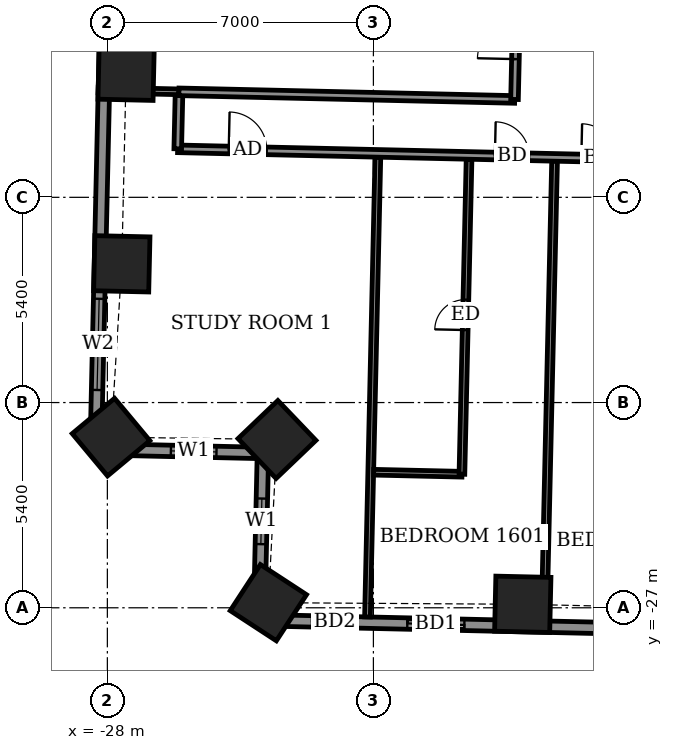
"""IFC4 building model, lengths in metres.
Left out: names, types, materials, properties, quantities, classifications, styles, units other than length and angle.
Written with IfcOpenShell. Run it as: python <this file> out.ifc"""

import sys

from ifc_helpers import new_model, si_unit, direction, frame, frame_2d, origin, origin_2d, place, context, subcontext, project, spatial, rectangle, extrude, element, fill, save


model = new_model("IFC4")
c1 = context("Model", 3, precision=1e-05, world=origin(), true_north=direction((0.0, 1.0)))
c2 = subcontext(c1, "Body", "Model", "MODEL_VIEW")
j1 = project(units=[si_unit("LENGTHUNIT", "METRE"), si_unit("PLANEANGLEUNIT", "RADIAN")], contexts=[c1])
p1 = place(None, origin())
s1 = spatial("IfcSite", under=j1, at=p1, CompositionType="ELEMENT")
p2 = place(p1, origin())
s2 = spatial("IfcBuilding", under=s1, at=p2, CompositionType="ELEMENT")
p3 = place(p2, frame((0.0, 0.0, 67.5)))
s3 = spatial("IfcBuildingStorey", under=s2, at=p3, CompositionType="ELEMENT", Elevation=67.5)
for number, where, z_axis, x_axis in (
    (1, (-27.506, -12.909, -0.55), (0.0, 0.0, 1.0), (-0.023, -1.0, 0.0)),
    (2, (-27.62, -17.949, -0.55), (0.0, 0.0, 1.0), (-0.023, -1.0, 0.0)),
    (3, (-27.903, -22.51, -0.55), (0.0, 0.0, 1.0), (0.64, -0.768, 0.0)),
    (4, (-23.537, -22.572, -0.55), (0.0, 0.0, 1.0), (0.691, -0.723, 0.0)),
    (5, (-23.763, -26.865, -0.55), (0.0, 0.0, 1.0), (0.837, -0.547, 0.0)),
    (6, (-17.07, -26.908, -0.55), (0.0, 0.0, 1.0), (1.0, -0.023, 0.0)),
):
    element("IfcColumn", number, at=place(p3, frame(where, z_axis=z_axis, x_axis=x_axis)), inside=s3, PredefinedType="COLUMN", context=c2, shape_type="SweptSolid", body=[
        extrude(rectangle(XDim=1.45, YDim=1.45, at=origin_2d()), origin(), (0.0, 0.0, 1.0), 3.6),
    ])
p4 = place(p3, frame((-27.965, -7.802, 0.0), z_axis=(0.0, 0.0, 1.0), x_axis=(-0.02267786199, -0.999742824218, 0.0)))
e7 = element("IfcWall", 7, at=p4, inside=s3, PredefinedType="SOLIDWALL", context=c2, shape_type="SweptSolid", body=[
    extrude(rectangle(XDim=15.029, YDim=0.3, at=frame_2d((7.514, 0.0))), origin(), (0.0, 0.0, 1.0), 3.05),
])
p5 = place(p4, frame((1.826, 0.0, 0.0)))
e8 = element("IfcOpeningElement", 8, at=p5, cuts=e7, PredefinedType="OPENING", context=c2, shape_type="SweptSolid", body=[
    extrude(rectangle(XDim=1.5, YDim=2.4, at=frame_2d((0.75, 1.2))), frame((0.0, 0.16, 0.0), z_axis=(0.0, -1.0, 0.0), x_axis=(1.0, 0.0, 0.0)), (0.0, 0.0, 1.0), 0.32),
])
p6 = place(p4, frame((11.071, 0.0, 0.9)))
e9 = element("IfcOpeningElement", 9, at=p6, cuts=e7, PredefinedType="OPENING", context=c2, shape_type="SweptSolid", body=[
    extrude(rectangle(XDim=2.4, YDim=1.5, at=frame_2d((1.2, 0.75))), frame((0.0, 0.16, 0.0), z_axis=(0.0, -1.0, 0.0), x_axis=(1.0, 0.0, 0.0)), (0.0, 0.0, 1.0), 0.32),
])
p7 = place(p3, frame((-28.306, -22.827, 0.0), z_axis=(0.0, 0.0, 1.0), x_axis=(0.999741204967, -0.022749133868, 0.0)))
e10 = element("IfcWall", 10, at=p7, inside=s3, PredefinedType="SOLIDWALL", context=c2, shape_type="SweptSolid", body=[
    extrude(rectangle(XDim=4.4, YDim=0.3, at=frame_2d((2.2, 0.0))), origin(), (0.0, 0.0, 1.0), 2.55),
])
p8 = place(p7, frame((1.978, 0.0, 0.9)))
e11 = element("IfcOpeningElement", 11, at=p8, cuts=e10, PredefinedType="OPENING", context=c2, shape_type="SweptSolid", body=[
    extrude(rectangle(XDim=1.2, YDim=1.5, at=frame_2d((0.6, 0.75))), frame((0.0, 0.16, 0.0), z_axis=(0.0, -1.0, 0.0), x_axis=(1.0, 0.0, 0.0)), (0.0, 0.0, 1.0), 0.32),
])
p9 = place(p3, frame((-23.907, -22.927, 0.0), z_axis=(0.0, 0.0, 1.0), x_axis=(-0.022749133868, -0.999741204967, 0.0)))
e12 = element("IfcWall", 12, at=p9, inside=s3, PredefinedType="SOLIDWALL", context=c2, shape_type="SweptSolid", body=[
    extrude(rectangle(XDim=4.4, YDim=0.3, at=frame_2d((2.2, 0.0))), origin(), (0.0, 0.0, 1.0), 2.55),
])
p10 = place(p9, frame((1.199, 0.0, 0.9)))
e13 = element("IfcOpeningElement", 13, at=p10, cuts=e12, PredefinedType="OPENING", context=c2, shape_type="SweptSolid", body=[
    extrude(rectangle(XDim=1.2, YDim=1.5, at=frame_2d((0.6, 0.75))), frame((0.0, 0.16, 0.0), z_axis=(0.0, -1.0, 0.0), x_axis=(1.0, 0.0, 0.0)), (0.0, 0.0, 1.0), 0.32),
])
p11 = place(p3, frame((-24.007, -27.326, 0.0), z_axis=(0.0, 0.0, 1.0), x_axis=(0.999742536491, -0.022690542744, 0.0)))
e14 = element("IfcWall", 14, at=p11, inside=s3, PredefinedType="SOLIDWALL", context=c2, shape_type="SweptSolid", body=[
    extrude(rectangle(XDim=49.236, YDim=0.3, at=frame_2d((24.618, 0.0))), origin(), (0.0, 0.0, 1.0), 3.05),
])
p12 = place(p11, frame((1.391, 0.0, 0.0)))
e15 = element("IfcOpeningElement", 15, at=p12, cuts=e14, PredefinedType="OPENING", context=c2, shape_type="SweptSolid", body=[
    extrude(rectangle(XDim=1.2, YDim=2.4, at=frame_2d((0.6, 1.2))), frame((0.0, 0.16, 0.0), z_axis=(0.0, -1.0, 0.0), x_axis=(1.0, 0.0, 0.0)), (0.0, 0.0, 1.0), 0.32),
])
p13 = place(p11, frame((3.901, 0.0, 0.0)))
e16 = element("IfcOpeningElement", 16, at=p13, cuts=e14, PredefinedType="OPENING", context=c2, shape_type="SweptSolid", body=[
    extrude(rectangle(XDim=1.5, YDim=2.4, at=frame_2d((0.75, 1.2))), frame((0.0, 0.16, 0.0), z_axis=(0.0, -1.0, 0.0), x_axis=(1.0, 0.0, 0.0)), (0.0, 0.0, 1.0), 0.32),
])
p14 = place(p11, frame((9.1, 0.0, 0.0)))
e17 = element("IfcOpeningElement", 17, at=p14, cuts=e14, PredefinedType="OPENING", context=c2, shape_type="SweptSolid", body=[
    extrude(rectangle(XDim=1.5, YDim=2.4, at=frame_2d((0.75, 1.2))), frame((0.0, 0.16, 0.0), z_axis=(0.0, -1.0, 0.0), x_axis=(1.0, 0.0, 0.0)), (0.0, 0.0, 1.0), 0.32),
])
p15 = place(p11, frame((14.889, 0.0, 0.0)))
e18 = element("IfcOpeningElement", 18, at=p15, cuts=e14, PredefinedType="OPENING", context=c2, shape_type="SweptSolid", body=[
    extrude(rectangle(XDim=1.5, YDim=2.4, at=frame_2d((0.75, 1.2))), frame((0.0, 0.16, 0.0), z_axis=(0.0, -1.0, 0.0), x_axis=(1.0, 0.0, 0.0)), (0.0, 0.0, 1.0), 0.32),
])
p16 = place(p11, frame((17.952, 0.0, 0.0)))
e19 = element("IfcOpeningElement", 19, at=p16, cuts=e14, PredefinedType="OPENING", context=c2, shape_type="SweptSolid", body=[
    extrude(rectangle(XDim=1.5, YDim=2.4, at=frame_2d((0.75, 1.2))), frame((0.0, 0.16, 0.0), z_axis=(0.0, -1.0, 0.0), x_axis=(1.0, 0.0, 0.0)), (0.0, 0.0, 1.0), 0.32),
])
p17 = place(p11, frame((22.878, 0.0, 0.0)))
e20 = element("IfcOpeningElement", 20, at=p17, cuts=e14, PredefinedType="OPENING", context=c2, shape_type="SweptSolid", body=[
    extrude(rectangle(XDim=1.5, YDim=2.4, at=frame_2d((0.75, 1.2))), frame((0.0, 0.16, 0.0), z_axis=(0.0, -1.0, 0.0), x_axis=(1.0, 0.0, 0.0)), (0.0, 0.0, 1.0), 0.32),
])
p18 = place(p11, frame((26.091, 0.0, 0.0)))
e21 = element("IfcOpeningElement", 21, at=p18, cuts=e14, PredefinedType="OPENING", context=c2, shape_type="SweptSolid", body=[
    extrude(rectangle(XDim=1.2, YDim=2.4, at=frame_2d((0.6, 1.2))), frame((0.0, 0.16, 0.0), z_axis=(0.0, -1.0, 0.0), x_axis=(1.0, 0.0, 0.0)), (0.0, 0.0, 1.0), 0.32),
])
p19 = place(p11, frame((31.754, 0.0, 0.0)))
e22 = element("IfcOpeningElement", 22, at=p19, cuts=e14, PredefinedType="OPENING", context=c2, shape_type="SweptSolid", body=[
    extrude(rectangle(XDim=1.5, YDim=2.4, at=frame_2d((0.75, 1.2))), frame((0.0, 0.16, 0.0), z_axis=(0.0, -1.0, 0.0), x_axis=(1.0, 0.0, 0.0)), (0.0, 0.0, 1.0), 0.32),
])
p20 = place(p11, frame((36.854, 0.0, 0.0)))
e23 = element("IfcOpeningElement", 23, at=p20, cuts=e14, PredefinedType="OPENING", context=c2, shape_type="SweptSolid", body=[
    extrude(rectangle(XDim=1.5, YDim=2.4, at=frame_2d((0.75, 1.2))), frame((0.0, 0.16, 0.0), z_axis=(0.0, -1.0, 0.0), x_axis=(1.0, 0.0, 0.0)), (0.0, 0.0, 1.0), 0.32),
])
p21 = place(p11, frame((39.917, 0.0, 0.0)))
e24 = element("IfcOpeningElement", 24, at=p21, cuts=e14, PredefinedType="OPENING", context=c2, shape_type="SweptSolid", body=[
    extrude(rectangle(XDim=1.5, YDim=2.4, at=frame_2d((0.75, 1.2))), frame((0.0, 0.16, 0.0), z_axis=(0.0, -1.0, 0.0), x_axis=(1.0, 0.0, 0.0)), (0.0, 0.0, 1.0), 0.32),
])
p22 = place(p11, frame((45.072, 0.0, 0.9)))
e25 = element("IfcOpeningElement", 25, at=p22, cuts=e14, PredefinedType="OPENING", context=c2, shape_type="SweptSolid", body=[
    extrude(rectangle(XDim=2.4, YDim=1.5, at=frame_2d((1.2, 0.75))), frame((0.0, 0.16, 0.0), z_axis=(0.0, -1.0, 0.0), x_axis=(1.0, 0.0, 0.0)), (0.0, 0.0, 1.0), 0.32),
])
p23 = place(p3, frame((-21.156, -27.241, 0.0), z_axis=(0.0, 0.0, 1.0), x_axis=(0.022636621344, 0.999743758857, 0.0)))
e26 = element("IfcWall", 26, at=p23, inside=s3, PredefinedType="PARTITIONING", context=c2, shape_type="SweptSolid", body=[
    extrude(rectangle(XDim=12.101, YDim=0.15, at=frame_2d((6.051, 0.0))), origin(), (0.0, 0.0, 1.0), 2.55),
])
p24 = place(p3, frame((-16.508, -27.346, 0.0), z_axis=(0.0, 0.0, 1.0), x_axis=(0.02273928012, 0.99974142914, 0.0)))
e27 = element("IfcWall", 27, at=p24, inside=s3, PredefinedType="PARTITIONING", context=c2, shape_type="SweptSolid", body=[
    extrude(rectangle(XDim=12.1, YDim=0.15, at=frame_2d((6.05, 0.0))), origin(), (0.0, 0.0, 1.0), 3.05),
])
p25 = place(p3, frame((-20.993, -23.433, 0.0), z_axis=(0.0, 0.0, 1.0), x_axis=(0.999740260747, -0.02279059109, 0.0)))
e28 = element("IfcWall", 28, at=p25, inside=s3, PredefinedType="PARTITIONING", context=c2, shape_type="SweptSolid", body=[
    extrude(rectangle(XDim=2.324, YDim=0.15, at=frame_2d((1.162, 0.0))), origin(), (0.0, 0.0, 1.0), 3.05),
])
p26 = place(p3, frame((-18.671, -23.486, 0.0), z_axis=(0.0, 0.0, 1.0), x_axis=(0.022675916361, 0.99974286835, 0.0)))
e29 = element("IfcWall", 29, at=p26, inside=s3, PredefinedType="PARTITIONING", context=c2, shape_type="SweptSolid", body=[
    extrude(rectangle(XDim=8.29, YDim=0.15, at=frame_2d((4.145, 0.0))), origin(), (0.0, 0.0, 1.0), 3.05),
])
p27 = place(p26, frame((3.795, 0.0, 0.0)))
e30 = element("IfcOpeningElement", 30, at=p27, cuts=e29, PredefinedType="OPENING", context=c2, shape_type="SweptSolid", body=[
    extrude(rectangle(XDim=0.8, YDim=2.1, at=frame_2d((0.4, 1.05))), frame((0.0, 0.085, 0.0), z_axis=(0.0, -1.0, 0.0), x_axis=(1.0, 0.0, 0.0)), (0.0, 0.0, 1.0), 0.17),
])
p28 = place(p3, frame((-26.151, -14.924, 0.0), z_axis=(0.0, 0.0, 1.0), x_axis=(0.999742750999, -0.022681089575, 0.0)))
e31 = element("IfcWall", 31, at=p28, inside=s3, PredefinedType="PARTITIONING", context=c2, shape_type="SweptSolid", body=[
    extrude(rectangle(XDim=54.886, YDim=0.2, at=frame_2d((27.443, 0.0))), origin(), (0.0, 0.0, 1.0), 3.05),
])
p29 = place(p28, frame((1.345, 0.0, 0.0)))
e32 = element("IfcOpeningElement", 32, at=p29, cuts=e31, PredefinedType="OPENING", context=c2, shape_type="SweptSolid", body=[
    extrude(rectangle(XDim=1.0, YDim=2.1, at=frame_2d((0.5, 1.05))), frame((0.0, 0.11, 0.0), z_axis=(0.0, -1.0, 0.0), x_axis=(1.0, 0.0, 0.0)), (0.0, 0.0, 1.0), 0.22),
])
p30 = place(p28, frame((8.35, 0.0, 0.0)))
e33 = element("IfcOpeningElement", 33, at=p30, cuts=e31, PredefinedType="OPENING", context=c2, shape_type="SweptSolid", body=[
    extrude(rectangle(XDim=0.9, YDim=2.1, at=frame_2d((0.45, 1.05))), frame((0.0, 0.11, 0.0), z_axis=(0.0, -1.0, 0.0), x_axis=(1.0, 0.0, 0.0)), (0.0, 0.0, 1.0), 0.22),
])
p31 = place(p28, frame((10.625, 0.0, 0.0)))
e34 = element("IfcOpeningElement", 34, at=p31, cuts=e31, PredefinedType="OPENING", context=c2, shape_type="SweptSolid", body=[
    extrude(rectangle(XDim=0.9, YDim=2.1, at=frame_2d((0.45, 1.05))), frame((0.0, 0.11, 0.0), z_axis=(0.0, -1.0, 0.0), x_axis=(1.0, 0.0, 0.0)), (0.0, 0.0, 1.0), 0.22),
])
p32 = place(p28, frame((17.675, 0.0, 0.0)))
e35 = element("IfcOpeningElement", 35, at=p32, cuts=e31, PredefinedType="OPENING", context=c2, shape_type="SweptSolid", body=[
    extrude(rectangle(XDim=0.9, YDim=2.1, at=frame_2d((0.45, 1.05))), frame((0.0, 0.11, 0.0), z_axis=(0.0, -1.0, 0.0), x_axis=(1.0, 0.0, 0.0)), (0.0, 0.0, 1.0), 0.22),
])
p33 = place(p28, frame((19.725, 0.0, 0.0)))
e36 = element("IfcOpeningElement", 36, at=p33, cuts=e31, PredefinedType="OPENING", context=c2, shape_type="SweptSolid", body=[
    extrude(rectangle(XDim=0.9, YDim=2.1, at=frame_2d((0.45, 1.05))), frame((0.0, 0.11, 0.0), z_axis=(0.0, -1.0, 0.0), x_axis=(1.0, 0.0, 0.0)), (0.0, 0.0, 1.0), 0.22),
])
p34 = place(p28, frame((26.575, 0.0, 0.0)))
e37 = element("IfcOpeningElement", 37, at=p34, cuts=e31, PredefinedType="OPENING", context=c2, shape_type="SweptSolid", body=[
    extrude(rectangle(XDim=0.9, YDim=2.1, at=frame_2d((0.45, 1.05))), frame((0.0, 0.11, 0.0), z_axis=(0.0, -1.0, 0.0), x_axis=(1.0, 0.0, 0.0)), (0.0, 0.0, 1.0), 0.22),
])
p35 = place(p28, frame((28.75, 0.0, 0.0)))
e38 = element("IfcOpeningElement", 38, at=p35, cuts=e31, PredefinedType="OPENING", context=c2, shape_type="SweptSolid", body=[
    extrude(rectangle(XDim=0.9, YDim=2.1, at=frame_2d((0.45, 1.05))), frame((0.0, 0.11, 0.0), z_axis=(0.0, -1.0, 0.0), x_axis=(1.0, 0.0, 0.0)), (0.0, 0.0, 1.0), 0.22),
])
p36 = place(p28, frame((35.875, 0.0, 0.0)))
e39 = element("IfcOpeningElement", 39, at=p36, cuts=e31, PredefinedType="OPENING", context=c2, shape_type="SweptSolid", body=[
    extrude(rectangle(XDim=0.9, YDim=2.1, at=frame_2d((0.45, 1.05))), frame((0.0, 0.11, 0.0), z_axis=(0.0, -1.0, 0.0), x_axis=(1.0, 0.0, 0.0)), (0.0, 0.0, 1.0), 0.22),
])
p37 = place(p28, frame((38.1, 0.0, 0.0)))
e40 = element("IfcOpeningElement", 40, at=p37, cuts=e31, PredefinedType="OPENING", context=c2, shape_type="SweptSolid", body=[
    extrude(rectangle(XDim=0.9, YDim=2.1, at=frame_2d((0.45, 1.05))), frame((0.0, 0.11, 0.0), z_axis=(0.0, -1.0, 0.0), x_axis=(1.0, 0.0, 0.0)), (0.0, 0.0, 1.0), 0.22),
])
p38 = place(p28, frame((45.125, 0.0, 0.0)))
e41 = element("IfcOpeningElement", 41, at=p38, cuts=e31, PredefinedType="OPENING", context=c2, shape_type="SweptSolid", body=[
    extrude(rectangle(XDim=0.9, YDim=2.1, at=frame_2d((0.45, 1.05))), frame((0.0, 0.11, 0.0), z_axis=(0.0, -1.0, 0.0), x_axis=(1.0, 0.0, 0.0)), (0.0, 0.0, 1.0), 0.22),
])
p39 = place(p28, frame((52.618, 0.0, 0.0)))
e42 = element("IfcOpeningElement", 42, at=p39, cuts=e31, PredefinedType="OPENING", context=c2, shape_type="SweptSolid", body=[
    extrude(rectangle(XDim=1.0, YDim=2.1, at=frame_2d((0.5, 1.05))), frame((0.0, 0.11, 0.0), z_axis=(0.0, -1.0, 0.0), x_axis=(1.0, 0.0, 0.0)), (0.0, 0.0, 1.0), 0.22),
])
p40 = place(p28, frame((47.575, 0.0, 0.0)))
e43 = element("IfcOpeningElement", 43, at=p40, cuts=e31, PredefinedType="OPENING", context=c2, shape_type="SweptSolid", body=[
    extrude(rectangle(XDim=0.9, YDim=2.1, at=frame_2d((0.45, 1.05))), frame((0.0, 0.11, 0.0), z_axis=(0.0, -1.0, 0.0), x_axis=(1.0, 0.0, 0.0)), (0.0, 0.0, 1.0), 0.22),
])
p41 = place(p3, frame((-26.148, -14.924, 0.0), z_axis=(0.0, 0.0, 1.0), x_axis=(0.022617910375, 0.999744182344, 0.0)))
e44 = element("IfcWall", 44, at=p41, inside=s3, PredefinedType="PARTITIONING", context=c2, shape_type="SweptSolid", body=[
    extrude(rectangle(XDim=1.5, YDim=0.2, at=frame_2d((0.75, 0.0))), origin(), (0.0, 0.0, 1.0), 3.05),
])
p42 = place(p3, frame((-28.242, -13.376, 0.0), z_axis=(0.0, 0.0, 1.0), x_axis=(0.999743965862, -0.022627477169, 0.0)))
e45 = element("IfcWall", 45, at=p42, inside=s3, PredefinedType="PARTITIONING", context=c2, shape_type="SweptSolid", body=[
    extrude(rectangle(XDim=2.125, YDim=0.15, at=frame_2d((1.063, 0.0))), origin(), (0.0, 0.0, 1.0), 3.05),
])
p43 = place(p3, frame((-26.117, -13.424, 0.0), z_axis=(0.0, 0.0, 1.0), x_axis=(0.999741493133, -0.022736466476, 0.0)))
e46 = element("IfcWall", 46, at=p43, inside=s3, PredefinedType="PARTITIONING", context=c2, shape_type="SweptSolid", body=[
    extrude(rectangle(XDim=8.837, YDim=0.2, at=frame_2d((4.418, 0.0))), origin(), (0.0, 0.0, 1.0), 3.05),
])
p44 = place(p3, frame((-17.287, -13.625, 0.0), z_axis=(0.0, 0.0, 1.0), x_axis=(0.022712214871, 0.999742044377, 0.0)))
e47 = element("IfcWall", 47, at=p44, inside=s3, PredefinedType="PARTITIONING", context=c2, shape_type="SweptSolid", body=[
    extrude(rectangle(XDim=26.551, YDim=0.2, at=frame_2d((13.275, 0.0))), origin(), (0.0, 0.0, 1.0), 3.05),
])
p45 = place(p44, frame((22.738, 0.0, 0.0)))
e48 = element("IfcOpeningElement", 48, at=p45, cuts=e47, PredefinedType="OPENING", context=c2, shape_type="SweptSolid", body=[
    extrude(rectangle(XDim=1.0, YDim=2.1, at=frame_2d((0.5, 1.05))), frame((0.0, 0.11, 0.0), z_axis=(0.0, -1.0, 0.0), x_axis=(1.0, 0.0, 0.0)), (0.0, 0.0, 1.0), 0.22),
])
p46 = place(p44, frame((24.9, 0.0, 0.0)))
e49 = element("IfcOpeningElement", 49, at=p46, cuts=e47, PredefinedType="OPENING", context=c2, shape_type="SweptSolid", body=[
    extrude(rectangle(XDim=0.9, YDim=2.1, at=frame_2d((0.45, 1.05))), frame((0.0, 0.11, 0.0), z_axis=(0.0, -1.0, 0.0), x_axis=(1.0, 0.0, 0.0)), (0.0, 0.0, 1.0), 0.22),
])
p47 = place(p44, frame((20.3, 0.0, 0.0)))
e50 = element("IfcOpeningElement", 50, at=p47, cuts=e47, PredefinedType="OPENING", context=c2, shape_type="SweptSolid", body=[
    extrude(rectangle(XDim=1.0, YDim=2.1, at=frame_2d((0.5, 1.05))), frame((0.0, 0.11, 0.0), z_axis=(0.0, -1.0, 0.0), x_axis=(1.0, 0.0, 0.0)), (0.0, 0.0, 1.0), 0.22),
])
p48 = place(p44, frame((15.025, 0.0, 0.0)))
e51 = element("IfcOpeningElement", 51, at=p48, cuts=e47, PredefinedType="OPENING", context=c2, shape_type="SweptSolid", body=[
    extrude(rectangle(XDim=1.0, YDim=2.1, at=frame_2d((0.5, 1.05))), frame((0.0, 0.11, 0.0), z_axis=(0.0, -1.0, 0.0), x_axis=(1.0, 0.0, 0.0)), (0.0, 0.0, 1.0), 0.22),
])
p49 = place(p44, frame((17.525, 0.0, 0.0)))
e52 = element("IfcOpeningElement", 52, at=p49, cuts=e47, PredefinedType="OPENING", context=c2, shape_type="SweptSolid", body=[
    extrude(rectangle(XDim=0.9, YDim=2.1, at=frame_2d((0.45, 1.05))), frame((0.0, 0.11, 0.0), z_axis=(0.0, -1.0, 0.0), x_axis=(1.0, 0.0, 0.0)), (0.0, 0.0, 1.0), 0.22),
])
p50 = place(p44, frame((11.678, 0.0, 0.0)))
e53 = element("IfcOpeningElement", 53, at=p50, cuts=e47, PredefinedType="OPENING", context=c2, shape_type="SweptSolid", body=[
    extrude(rectangle(XDim=1.0, YDim=2.1, at=frame_2d((0.5, 1.05))), frame((0.0, 0.11, 0.0), z_axis=(0.0, -1.0, 0.0), x_axis=(1.0, 0.0, 0.0)), (0.0, 0.0, 1.0), 0.22),
])
p51 = place(p44, frame((8.45, 0.0, 0.0)))
e54 = element("IfcOpeningElement", 54, at=p51, cuts=e47, PredefinedType="OPENING", context=c2, shape_type="SweptSolid", body=[
    extrude(rectangle(XDim=1.0, YDim=2.1, at=frame_2d((0.5, 1.05))), frame((0.0, 0.11, 0.0), z_axis=(0.0, -1.0, 0.0), x_axis=(1.0, 0.0, 0.0)), (0.0, 0.0, 1.0), 0.22),
])
p52 = place(p44, frame((6.275, 0.0, 0.0)))
e55 = element("IfcOpeningElement", 55, at=p52, cuts=e47, PredefinedType="OPENING", context=c2, shape_type="SweptSolid", body=[
    extrude(rectangle(XDim=0.9, YDim=2.1, at=frame_2d((0.45, 1.05))), frame((0.0, 0.11, 0.0), z_axis=(0.0, -1.0, 0.0), x_axis=(1.0, 0.0, 0.0)), (0.0, 0.0, 1.0), 0.22),
])
p53 = place(p44, frame((1.062, 0.0, 0.0)))
e56 = element("IfcOpeningElement", 56, at=p53, cuts=e47, PredefinedType="OPENING", context=c2, shape_type="SweptSolid", body=[
    extrude(rectangle(XDim=1.0, YDim=2.1, at=frame_2d((0.5, 1.05))), frame((0.0, 0.11, 0.0), z_axis=(0.0, -1.0, 0.0), x_axis=(1.0, 0.0, 0.0)), (0.0, 0.0, 1.0), 0.22),
])
p54 = place(p44, frame((3.875, 0.0, 0.0)))
e57 = element("IfcOpeningElement", 57, at=p54, cuts=e47, PredefinedType="OPENING", context=c2, shape_type="SweptSolid", body=[
    extrude(rectangle(XDim=0.9, YDim=2.1, at=frame_2d((0.45, 1.05))), frame((0.0, 0.11, 0.0), z_axis=(0.0, -1.0, 0.0), x_axis=(1.0, 0.0, 0.0)), (0.0, 0.0, 1.0), 0.22),
])
p55 = place(p6, origin())
e58 = element("IfcWindow", 58, at=p55, inside=s3, PartitioningType="DOUBLE_PANEL_VERTICAL", PredefinedType="WINDOW", context=c2, shape_type="SweptSolid", body=[
    extrude(rectangle(XDim=2.4, YDim=1.5, at=frame_2d((1.2, 0.75))), frame((0.0, 0.03, 0.0), z_axis=(0.0, -1.0, 0.0), x_axis=(1.0, 0.0, 0.0)), (0.0, 0.0, 1.0), 0.06),
])
fill(e9, e58)
p56 = place(p8, origin())
e59 = element("IfcWindow", 59, at=p56, inside=s3, PartitioningType="SINGLE_PANEL", PredefinedType="WINDOW", context=c2, shape_type="SweptSolid", body=[
    extrude(rectangle(XDim=1.2, YDim=1.5, at=frame_2d((0.6, 0.75))), frame((0.0, 0.03, 0.0), z_axis=(0.0, -1.0, 0.0), x_axis=(1.0, 0.0, 0.0)), (0.0, 0.0, 1.0), 0.06),
])
fill(e11, e59)
p57 = place(p10, origin())
e60 = element("IfcWindow", 60, at=p57, inside=s3, PartitioningType="SINGLE_PANEL", PredefinedType="WINDOW", context=c2, shape_type="SweptSolid", body=[
    extrude(rectangle(XDim=1.2, YDim=1.5, at=frame_2d((0.6, 0.75))), frame((0.0, 0.03, 0.0), z_axis=(0.0, -1.0, 0.0), x_axis=(1.0, 0.0, 0.0)), (0.0, 0.0, 1.0), 0.06),
])
fill(e13, e60)
p58 = place(p12, origin())
e61 = element("IfcDoor", 61, at=p58, inside=s3, OperationType="SLIDING_TO_LEFT", PredefinedType="DOOR", context=c2, shape_type="SweptSolid", body=[
    extrude(rectangle(XDim=1.2, YDim=2.4, at=frame_2d((0.6, 1.2))), frame((0.0, 0.025, 0.0), z_axis=(0.0, -1.0, 0.0), x_axis=(1.0, 0.0, 0.0)), (0.0, 0.0, 1.0), 0.05),
])
fill(e15, e61)
p59 = place(p13, origin())
e62 = element("IfcDoor", 62, at=p59, inside=s3, OperationType="SLIDING_TO_LEFT", PredefinedType="DOOR", context=c2, shape_type="SweptSolid", body=[
    extrude(rectangle(XDim=1.5, YDim=2.4, at=frame_2d((0.75, 1.2))), frame((0.0, 0.025, 0.0), z_axis=(0.0, -1.0, 0.0), x_axis=(1.0, 0.0, 0.0)), (0.0, 0.0, 1.0), 0.05),
])
fill(e16, e62)
p60 = place(p29, origin())
e63 = element("IfcDoor", 63, at=p60, inside=s3, OperationType="SINGLE_SWING_LEFT", PredefinedType="DOOR", context=c2, shape_type="SweptSolid", body=[
    extrude(rectangle(XDim=1.0, YDim=2.1, at=frame_2d((0.5, 1.05))), frame((0.0, 0.025, 0.0), z_axis=(0.0, -1.0, 0.0), x_axis=(1.0, 0.0, 0.0)), (0.0, 0.0, 1.0), 0.05),
])
fill(e32, e63)
p61 = place(p30, origin())
e64 = element("IfcDoor", 64, at=p61, inside=s3, OperationType="SINGLE_SWING_LEFT", PredefinedType="DOOR", context=c2, shape_type="SweptSolid", body=[
    extrude(rectangle(XDim=0.9, YDim=2.1, at=frame_2d((0.45, 1.05))), frame((0.0, 0.025, 0.0), z_axis=(0.0, -1.0, 0.0), x_axis=(1.0, 0.0, 0.0)), (0.0, 0.0, 1.0), 0.05),
])
fill(e33, e64)
p62 = place(p27, origin())
e65 = element("IfcDoor", 65, at=p62, inside=s3, OperationType="SINGLE_SWING_LEFT", PredefinedType="DOOR", context=c2, shape_type="SweptSolid", body=[
    extrude(rectangle(XDim=0.8, YDim=2.1, at=frame_2d((0.4, 1.05))), frame((0.0, 0.025, 0.0), z_axis=(0.0, -1.0, 0.0), x_axis=(1.0, 0.0, 0.0)), (0.0, 0.0, 1.0), 0.05),
])
fill(e30, e65)
p63 = place(p31, origin())
e66 = element("IfcDoor", 66, at=p63, inside=s3, OperationType="SINGLE_SWING_RIGHT", PredefinedType="DOOR", context=c2, shape_type="SweptSolid", body=[
    extrude(rectangle(XDim=0.9, YDim=2.1, at=frame_2d((0.45, 1.05))), frame((0.0, 0.025, 0.0), z_axis=(0.0, -1.0, 0.0), x_axis=(1.0, 0.0, 0.0)), (0.0, 0.0, 1.0), 0.05),
])
fill(e34, e66)
p64 = place(p53, origin())
e67 = element("IfcDoor", 67, at=p64, inside=s3, OperationType="SINGLE_SWING_RIGHT", PredefinedType="DOOR", context=c2, shape_type="SweptSolid", body=[
    extrude(rectangle(XDim=1.0, YDim=2.1, at=frame_2d((0.5, 1.05))), frame((0.0, 0.025, 0.0), z_axis=(0.0, -1.0, 0.0), x_axis=(1.0, 0.0, 0.0)), (0.0, 0.0, 1.0), 0.05),
])
fill(e56, e67)
save(model, sys.argv[1])
